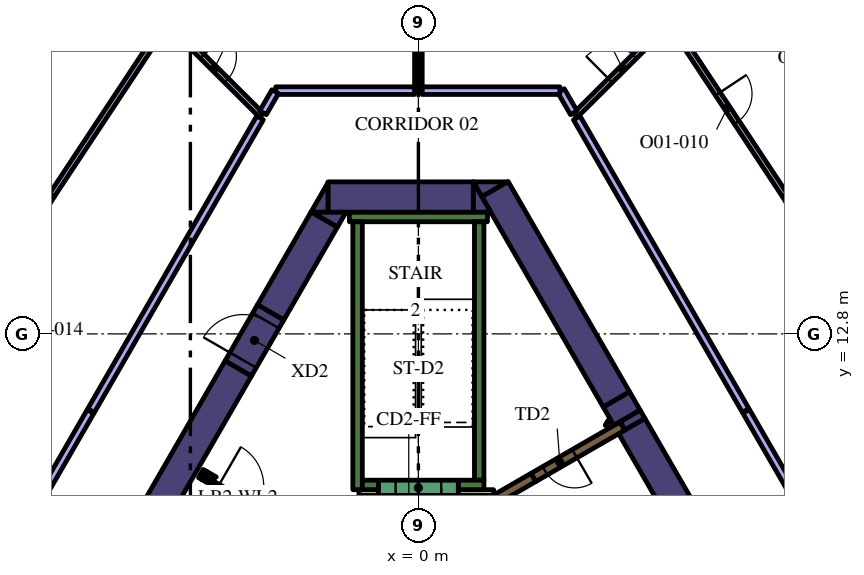
"""IFC4 building model, lengths in metres.
Left out: names, types, materials, properties, quantities, classifications, styles, units other than length and angle.
Written with IfcOpenShell. Run it as: python <this file> out.ifc"""

import sys

from ifc_helpers import new_model, si_unit, direction, frame, frame_2d, origin, place, context, subcontext, project, spatial, polyline, rectangle, outline, extrude, element, fill, save


model = new_model("IFC4")
c1 = context("Model", 3, precision=1e-05, world=origin(), true_north=direction((0.0, 1.0)))
c2 = subcontext(c1, "Body", "Model", "MODEL_VIEW")
j1 = project(units=[si_unit("LENGTHUNIT", "METRE"), si_unit("PLANEANGLEUNIT", "RADIAN")], contexts=[c1])
p1 = place(None, origin())
s1 = spatial("IfcSite", under=j1, at=p1, CompositionType="ELEMENT")
p2 = place(p1, origin())
s2 = spatial("IfcBuilding", under=s1, at=p2, CompositionType="ELEMENT")
p3 = place(p2, frame((0.0, 0.0, 150.0)))
s3 = spatial("IfcBuildingStorey", under=s2, at=p3, CompositionType="ELEMENT", Elevation=150.0)
p4 = place(p3, frame((5.489, 10.594, 0.0), z_axis=(0.0, 0.0, 1.0), x_axis=(-0.500000383388, 0.866025182435, 0.0)))
e1 = element("IfcWall", 1, at=p4, inside=s3, PredefinedType="SOLIDWALL", context=c2, shape_type="SweptSolid", body=[
    extrude(rectangle(XDim=0.558, YDim=0.8, at=frame_2d((0.279, 0.0))), origin(), (0.0, 0.0, 1.0), 4.2),
])
p5 = place(p3, frame((5.615, 10.375, 0.0), z_axis=(0.0, 0.0, 1.0), x_axis=(0.500002746266, -0.866023818221, 0.0)))
e2 = element("IfcWall", 2, at=p5, inside=s3, PredefinedType="SOLIDWALL", context=c2, shape_type="SweptSolid", body=[
    extrude(rectangle(XDim=5.328, YDim=0.8, at=frame_2d((2.664, 0.0))), origin(), (0.0, 0.0, 1.0), 4.2),
])
p6 = place(p3, origin())
e3 = element("IfcWall", 3, at=p6, inside=s3, PredefinedType="SOLIDWALL", context=c2, shape_type="SweptSolid", body=[
    extrude(outline(polyline([(5.432, 10.272), (5.308, 10.487), (5.836, 10.792), (5.96, 10.577), (5.432, 10.272)])), origin(), (0.0, 0.0, 1.0), 4.2),
])
p7 = place(p3, frame((5.209, 11.078, 0.0), z_axis=(0.0, 0.0, 1.0), x_axis=(-0.500035624827, 0.866004834804, 0.0)))
e4 = element("IfcWall", 4, at=p7, inside=s3, PredefinedType="SOLIDWALL", context=c2, shape_type="SweptSolid", body=[
    extrude(rectangle(XDim=6.388, YDim=0.8, at=frame_2d((3.194, 0.0))), origin(), (0.0, 0.0, 1.0), 4.2),
])
e5 = element("IfcWall", 5, at=p6, inside=s3, PredefinedType="SOLIDWALL", context=c2, shape_type="SweptSolid", body=[
    extrude(outline(polyline([(1.443, 16.8), (2.339, 16.8), (1.667, 16.412), (1.443, 16.8)])), origin(), (0.0, 0.0, 1.0), 4.2),
])
p8 = place(p3, frame((-2.379, 16.4, 0.0), z_axis=(0.0, 0.0, 1.0), x_axis=(1.0, 0.0, 0.0)))
e6 = element("IfcWall", 6, at=p8, inside=s3, PredefinedType="SOLIDWALL", context=c2, shape_type="SweptSolid", body=[
    extrude(rectangle(XDim=3.824, YDim=0.8, at=frame_2d((1.912, 0.0))), origin(), (0.0, 0.0, 1.0), 4.2),
])
e7 = element("IfcWall", 7, at=p6, inside=s3, PredefinedType="SOLIDWALL", context=c2, shape_type="SweptSolid", body=[
    extrude(outline(polyline([(1.905, 16.0), (1.447, 16.0), (1.447, 16.793), (1.905, 16.0)])), origin(), (0.0, 0.0, 1.0), 4.2),
])
e8 = element("IfcWall", 8, at=p6, inside=s3, PredefinedType="SOLIDWALL", context=c2, shape_type="SweptSolid", body=[
    extrude(outline(polyline([(-2.829, 16.0), (-2.381, 16.776), (-2.381, 16.0), (-2.829, 16.0)])), origin(), (0.0, 0.0, 1.0), 4.2),
])
p9 = place(p3, frame((-2.477, 15.81, 0.0), z_axis=(0.0, 0.0, 1.0), x_axis=(-0.499969377405, -0.866043083026, 0.0)))
e9 = element("IfcWall", 9, at=p9, inside=s3, PredefinedType="SOLIDWALL", context=c2, shape_type="SweptSolid", body=[
    extrude(rectangle(XDim=2.824, YDim=0.8, at=frame_2d((1.412, 0.0))), origin(), (0.0, 0.0, 1.0), 4.2),
])
e10 = element("IfcWall", 10, at=p6, inside=s3, PredefinedType="SOLIDWALL", context=c2, shape_type="SweptSolid", body=[
    extrude(outline(polyline([(-1.905, 16.0), (-2.129, 15.612), (-2.801, 16.0), (-1.905, 16.0)])), origin(), (0.0, 0.0, 1.0), 4.2),
])
p10 = place(p3, frame((-12.668, -1.842, 0.0), z_axis=(0.0, 0.0, 1.0), x_axis=(0.500003640647, 0.866023301845, 0.0)))
e11 = element("IfcWall", 11, at=p10, inside=s3, PredefinedType="SOLIDWALL", context=c2, shape_type="SweptSolid", body=[
    extrude(rectangle(XDim=15.858, YDim=0.8, at=frame_2d((7.929, 0.0))), origin(), (0.0, 0.0, 1.0), 4.2),
])
p11 = place(p3, frame((-1.817, 15.875, 0.0), z_axis=(0.0, 0.0, 1.0), x_axis=(1.0, 0.0, 0.0)))
e12 = element("IfcWall", 12, at=p11, inside=s3, PredefinedType="SOLIDWALL", context=c2, shape_type="SweptSolid", body=[
    extrude(rectangle(XDim=3.634, YDim=0.25, at=frame_2d((1.817, 0.0))), origin(), (0.0, 0.0, 1.0), 4.2),
])
p12 = place(p3, frame((1.6, 8.95, 0.0), z_axis=(0.0, 0.0, 1.0), x_axis=(0.0, 1.0, 0.0)))
e13 = element("IfcWall", 13, at=p12, inside=s3, PredefinedType="SOLIDWALL", context=c2, shape_type="SweptSolid", body=[
    extrude(rectangle(XDim=6.8, YDim=0.25, at=frame_2d((3.4, 0.0))), origin(), (0.0, 0.0, 1.0), 4.2),
])
p13 = place(p3, frame((1.05, 8.825, 0.0), z_axis=(0.0, 0.0, 1.0), x_axis=(1.0, 0.0, 0.0)))
e14 = element("IfcWall", 14, at=p13, inside=s3, PredefinedType="SOLIDWALL", context=c2, shape_type="SweptSolid", body=[
    extrude(rectangle(XDim=0.675, YDim=0.25, at=frame_2d((0.337, 0.0))), origin(), (0.0, 0.0, 1.0), 4.2),
])
p14 = place(p3, frame((-1.6, 8.7, 0.0), z_axis=(0.0, 0.0, 1.0), x_axis=(0.0, 1.0, 0.0)))
e15 = element("IfcWall", 15, at=p14, inside=s3, PredefinedType="SOLIDWALL", context=c2, shape_type="SweptSolid", body=[
    extrude(rectangle(XDim=7.05, YDim=0.25, at=frame_2d((3.525, 0.0))), origin(), (0.0, 0.0, 1.0), 4.2),
])
p15 = place(p3, frame((-1.475, 8.825, 0.0), z_axis=(0.0, 0.0, 1.0), x_axis=(1.0, 0.0, 0.0)))
e16 = element("IfcWall", 16, at=p15, inside=s3, PredefinedType="SOLIDWALL", context=c2, shape_type="SweptSolid", body=[
    extrude(rectangle(XDim=0.425, YDim=0.25, at=frame_2d((0.212, 0.0))), origin(), (0.0, 0.0, 1.0), 4.2),
])
p16 = place(p3, frame((3.028, 9.023, 0.0), z_axis=(0.0, 0.0, 1.0), x_axis=(-0.866036587186, -0.49998062928, 0.0)))
e17 = element("IfcWall", 17, at=p16, inside=s3, PredefinedType="SOLIDWALL", context=c2, shape_type="SweptSolid", body=[
    extrude(rectangle(XDim=3.384, YDim=0.25, at=frame_2d((1.692, 0.0))), origin(), (0.0, 0.0, 1.0), 4.2),
])
p17 = place(p3, frame((-5.725, 9.125, 0.0), z_axis=(0.0, 0.0, 1.0), x_axis=(0.866185586049, -0.49972245349, 0.0)))
e18 = element("IfcWall", 18, at=p17, inside=s3, PredefinedType="SOLIDWALL", context=c2, shape_type="SweptSolid", body=[
    extrude(rectangle(XDim=0.11, YDim=0.25, at=frame_2d((0.055, 0.0))), origin(), (0.0, 0.0, 1.0), 4.2),
])
e19 = element("IfcWall", 19, at=p6, inside=s3, PredefinedType="SOLIDWALL", context=c2, shape_type="SweptSolid", body=[
    extrude(outline(polyline([(-5.689, 8.96), (-5.69, 8.961), (-5.565, 9.177), (-5.319, 9.035), (-5.335, 9.026), (-5.351, 9.015), (-5.366, 9.002), (-5.379, 8.988), (-5.392, 8.972), (-5.402, 8.956), (-5.412, 8.939), (-5.629, 9.064), (-5.629, 9.064), (-5.689, 8.96)])), origin(), (0.0, 0.0, 1.0), 4.2),
])
p18 = place(p3, frame((1.05, 8.625, 0.0), z_axis=(0.0, 0.0, 1.0), x_axis=(1.0, 0.0, 0.0)))
e20 = element("IfcWall", 20, at=p18, inside=s3, PredefinedType="PARTITIONING", context=c2, shape_type="SweptSolid", body=[
    extrude(rectangle(XDim=0.929, YDim=0.15, at=frame_2d((0.464, 0.0))), origin(), (0.0, 0.0, 1.0), 3.15),
])
p19 = place(p3, frame((-1.564, 8.625, 0.0), z_axis=(0.0, 0.0, 1.0), x_axis=(1.0, 0.0, 0.0)))
e21 = element("IfcWall", 21, at=p19, inside=s3, PredefinedType="PARTITIONING", context=c2, shape_type="SweptSolid", body=[
    extrude(rectangle(XDim=0.514, YDim=0.15, at=frame_2d((0.257, 0.0))), origin(), (0.0, 0.0, 1.0), 3.15),
])
p20 = place(p3, frame((4.98, 10.358, 0.0), z_axis=(0.0, 0.0, 1.0), x_axis=(0.500640202437, 0.86565546709, 0.0)))
e22 = element("IfcWall", 22, at=p20, inside=s3, PredefinedType="PARTITIONING", context=c2, shape_type="SweptSolid", body=[
    extrude(rectangle(XDim=0.146, YDim=0.15, at=frame_2d((0.073, 0.0))), origin(), (0.0, 0.0, 1.0), 3.15),
])
p21 = place(p3, frame((8.565, -2.185, 0.0), z_axis=(0.0, 0.0, 1.0), x_axis=(-0.499997954832, 0.866026584559, 0.0)))
e23 = element("IfcWall", 23, at=p21, inside=s3, PredefinedType="SOLIDWALL", context=c2, shape_type="SweptSolid", body=[
    extrude(rectangle(XDim=12.35, YDim=0.25, at=frame_2d((6.175, 0.0))), origin(), (0.0, 0.0, 1.0), 4.2),
])
p22 = place(p21, frame((0.585, 0.0, 0.0)))
e24 = element("IfcOpeningElement", 24, at=p22, cuts=e23, PredefinedType="OPENING", context=c2, shape_type="SweptSolid", body=[
    extrude(rectangle(XDim=1.1, YDim=2.1, at=frame_2d((0.55, 1.05))), frame((0.0, 0.135, 0.0), z_axis=(0.0, -1.0, 0.0), x_axis=(1.0, 0.0, 0.0)), (0.0, 0.0, 1.0), 0.27),
])
p23 = place(p3, frame((1.05, 8.75, 0.0), z_axis=(0.0, 0.0, 1.0), x_axis=(-1.0, 0.0, 0.0)))
e25 = element("IfcWall", 25, at=p23, inside=s3, PredefinedType="SOLIDWALL", context=c2, shape_type="SweptSolid", body=[
    extrude(rectangle(XDim=2.1, YDim=0.4, at=frame_2d((1.05, 0.0))), origin(), (0.0, 0.0, 1.0), 4.2),
])
p24 = place(p23, frame((0.45, 0.0, 0.0)))
e26 = element("IfcOpeningElement", 26, at=p24, cuts=e25, PredefinedType="OPENING", context=c2, shape_type="SweptSolid", body=[
    extrude(rectangle(XDim=1.2, YDim=2.1, at=frame_2d((0.6, 1.05))), frame((0.0, 0.21, 0.0), z_axis=(0.0, -1.0, 0.0), x_axis=(1.0, 0.0, 0.0)), (0.0, 0.0, 1.0), 0.42),
])
p25 = place(p3, frame((5.366, 10.373, 0.0), z_axis=(0.0, 0.0, 1.0), x_axis=(-0.866019956843, -0.50000943426, 0.0)))
e27 = element("IfcWall", 27, at=p25, inside=s3, PredefinedType="SOLIDWALL", context=c2, shape_type="SweptSolid", body=[
    extrude(rectangle(XDim=2.7, YDim=0.25, at=frame_2d((1.35, 0.0))), origin(), (0.0, 0.0, 1.0), 4.2),
])
p26 = place(p25, frame((1.45, 0.0, 0.0)))
e28 = element("IfcOpeningElement", 28, at=p26, cuts=e27, PredefinedType="OPENING", context=c2, shape_type="SweptSolid", body=[
    extrude(rectangle(XDim=0.9, YDim=2.1, at=frame_2d((0.45, 1.05))), frame((0.0, 0.135, 0.0), z_axis=(0.0, -1.0, 0.0), x_axis=(1.0, 0.0, 0.0)), (0.0, 0.0, 1.0), 0.27),
])
p27 = place(p3, frame((-5.659, 9.012, 0.0), z_axis=(0.0, 0.0, 1.0), x_axis=(0.866009402589, -0.500027713859, 0.0)))
e29 = element("IfcWall", 29, at=p27, inside=s3, PredefinedType="PARTITIONING", context=c2, shape_type="SweptSolid", body=[
    extrude(rectangle(XDim=2.1, YDim=0.12, at=frame_2d((1.05, 0.0))), origin(), (0.0, 0.0, 1.0), 3.15),
])
p28 = place(p27, frame((0.45, 0.0, 0.0)))
e30 = element("IfcOpeningElement", 30, at=p28, cuts=e29, PredefinedType="OPENING", context=c2, shape_type="SweptSolid", body=[
    extrude(rectangle(XDim=1.2, YDim=2.1, at=frame_2d((0.6, 1.05))), frame((0.0, 0.07, 0.0), z_axis=(0.0, -1.0, 0.0), x_axis=(1.0, 0.0, 0.0)), (0.0, 0.0, 1.0), 0.14),
])
p29 = place(p3, frame((-4.739, 11.892, 0.0), z_axis=(0.0, 0.0, 1.0), x_axis=(0.500062241894, 0.865989465428, 0.0)))
e31 = element("IfcWall", 31, at=p29, inside=s3, PredefinedType="SOLIDWALL", context=c2, shape_type="SweptSolid", body=[
    extrude(rectangle(XDim=1.7, YDim=0.8, at=frame_2d((0.85, 0.0))), origin(), (0.0, 0.0, 1.0), 4.2),
])
p30 = place(p29, frame((0.25, 0.0, 0.0)))
e32 = element("IfcOpeningElement", 32, at=p30, cuts=e31, PredefinedType="OPENING", context=c2, shape_type="SweptSolid", body=[
    extrude(rectangle(XDim=1.2, YDim=2.1, at=frame_2d((0.6, 1.05))), frame((0.0, 0.41, 0.0), z_axis=(0.0, -1.0, 0.0), x_axis=(1.0, 0.0, 0.0)), (0.0, 0.0, 1.0), 0.82),
])
p31 = place(p3, frame((11.19, 13.951, 0.0), z_axis=(0.0, 0.0, 1.0), x_axis=(-0.526165616903, 0.850382116221, 0.0)))
e33 = element("IfcWall", 33, at=p31, inside=s3, PredefinedType="PARTITIONING", context=c2, shape_type="SweptSolid", body=[
    extrude(rectangle(XDim=2.935, YDim=0.15, at=frame_2d((1.468, 0.0))), origin(), (0.0, 0.0, 1.0), 3.15),
])
p32 = place(p3, frame((6.616, 21.024, 0.0), z_axis=(0.0, 0.0, 1.0), x_axis=(0.551915124006, -0.833900291338, 0.0)))
e34 = element("IfcWall", 34, at=p32, inside=s3, PredefinedType="PARTITIONING", context=c2, shape_type="SweptSolid", body=[
    extrude(rectangle(XDim=5.488, YDim=0.15, at=frame_2d((2.744, 0.0))), origin(), (0.0, 0.0, 1.0), 3.15),
])
p33 = place(p32, frame((2.288, 0.0, 0.0)))
e35 = element("IfcOpeningElement", 35, at=p33, cuts=e34, PredefinedType="OPENING", context=c2, shape_type="SweptSolid", body=[
    extrude(rectangle(XDim=0.9, YDim=2.1, at=frame_2d((0.45, 1.05))), frame((0.0, 0.085, 0.0), z_axis=(0.0, -1.0, 0.0), x_axis=(1.0, 0.0, 0.0)), (0.0, 0.0, 1.0), 0.17),
])
p34 = place(p3, frame((4.128, 18.55, 0.0), z_axis=(0.0, 0.0, 1.0), x_axis=(0.709237676072, 0.704969445324, 0.0)))
e36 = element("IfcWall", 36, at=p34, inside=s3, PredefinedType="PARTITIONING", context=c2, shape_type="SweptSolid", body=[
    extrude(rectangle(XDim=3.432, YDim=0.15, at=frame_2d((1.716, 0.0))), origin(), (0.0, 0.0, 1.0), 3.15),
])
p35 = place(p34, frame((1.3, 0.0, 0.0)))
e37 = element("IfcOpeningElement", 37, at=p35, cuts=e36, PredefinedType="OPENING", context=c2, shape_type="SweptSolid", body=[
    extrude(rectangle(XDim=0.9, YDim=2.1, at=frame_2d((0.45, 1.05))), frame((0.0, 0.085, 0.0), z_axis=(0.0, -1.0, 0.0), x_axis=(1.0, 0.0, 0.0)), (0.0, 0.0, 1.0), 0.17),
])
p36 = place(p3, frame((13.63, 2.091, 0.0), z_axis=(0.0, 0.0, 1.0), x_axis=(-0.499990634175, 0.866030811078, 0.0)))
e38 = element("IfcWall", 38, at=p36, inside=s3, PredefinedType="PARTITIONING", context=c2, shape_type="SweptSolid", body=[
    extrude(rectangle(XDim=10.008, YDim=0.2, at=frame_2d((5.004, 0.0))), origin(), (0.0, 0.0, 1.0), 3.15),
])
p37 = place(p36, frame((4.5, 0.0, 0.0)))
e39 = element("IfcOpeningElement", 39, at=p37, cuts=e38, PredefinedType="OPENING", context=c2, shape_type="SweptSolid", body=[
    extrude(rectangle(XDim=1.0, YDim=2.1, at=frame_2d((0.5, 1.05))), frame((0.0, 0.11, 0.0), z_axis=(0.0, -1.0, 0.0), x_axis=(1.0, 0.0, 0.0)), (0.0, 0.0, 1.0), 0.22),
])
p38 = place(p3, frame((8.611, 10.785, 0.0), z_axis=(0.0, 0.0, 1.0), x_axis=(-0.499987928593, 0.866032373102, 0.0)))
e40 = element("IfcWall", 40, at=p38, inside=s3, PredefinedType="PARTITIONING", context=c2, shape_type="SweptSolid", body=[
    extrude(rectangle(XDim=8.889, YDim=0.2, at=frame_2d((4.445, 0.0))), origin(), (0.0, 0.0, 1.0), 3.15),
])
p39 = place(p3, frame((0.0, 19.2, 0.0), z_axis=(0.0, 0.0, 1.0), x_axis=(0.0, 1.0, 0.0)))
e41 = element("IfcWall", 41, at=p39, inside=s3, PredefinedType="PARTITIONING", context=c2, shape_type="SweptSolid", body=[
    extrude(rectangle(XDim=10.154, YDim=0.2, at=frame_2d((5.077, 0.0))), origin(), (0.0, 0.0, 1.0), 3.15),
])
p40 = place(p3, frame((4.089, 18.617, 0.0), z_axis=(0.0, 0.0, 1.0), x_axis=(-0.500120377296, 0.865955892764, 0.0)))
e42 = element("IfcWall", 42, at=p40, inside=s3, PredefinedType="PARTITIONING", context=c2, shape_type="SweptSolid", body=[
    extrude(rectangle(XDim=0.673, YDim=0.2, at=frame_2d((0.336, 0.0))), origin(), (0.0, 0.0, 1.0), 3.15),
])
p41 = place(p3, frame((3.723, 19.2, 0.0), z_axis=(0.0, 0.0, 1.0), x_axis=(-1.0, 0.0, 0.0)))
e43 = element("IfcWall", 43, at=p41, inside=s3, PredefinedType="PARTITIONING", context=c2, shape_type="SweptSolid", body=[
    extrude(rectangle(XDim=3.623, YDim=0.2, at=frame_2d((1.812, 0.0))), origin(), (0.0, 0.0, 1.0), 3.15),
])
p42 = place(p3, frame((-6.619, 21.027, 0.0), z_axis=(0.0, 0.0, 1.0), x_axis=(0.709188943058, -0.705018470002, 0.0)))
e44 = element("IfcWall", 44, at=p42, inside=s3, PredefinedType="PARTITIONING", context=c2, shape_type="SweptSolid", body=[
    extrude(rectangle(XDim=3.512, YDim=0.15, at=frame_2d((1.756, 0.0))), origin(), (0.0, 0.0, 1.0), 3.15),
])
p43 = place(p42, frame((1.312, 0.0, 0.0)))
e45 = element("IfcOpeningElement", 45, at=p43, cuts=e44, PredefinedType="OPENING", context=c2, shape_type="SweptSolid", body=[
    extrude(rectangle(XDim=0.9, YDim=2.1, at=frame_2d((0.45, 1.05))), frame((0.0, 0.085, 0.0), z_axis=(0.0, -1.0, 0.0), x_axis=(1.0, 0.0, 0.0)), (0.0, 0.0, 1.0), 0.17),
])
p44 = place(p3, frame((-0.1, 19.2, 0.0), z_axis=(0.0, 0.0, 1.0), x_axis=(-1.0, 0.0, 0.0)))
e46 = element("IfcWall", 46, at=p44, inside=s3, PredefinedType="PARTITIONING", context=c2, shape_type="SweptSolid", body=[
    extrude(rectangle(XDim=3.653, YDim=0.2, at=frame_2d((1.826, 0.0))), origin(), (0.0, 0.0, 1.0), 3.15),
])
p45 = place(p3, frame((-3.768, 19.174, 0.0), z_axis=(0.0, 0.0, 1.0), x_axis=(-0.499897828833, -0.8660843843, 0.0)))
e47 = element("IfcWall", 47, at=p45, inside=s3, PredefinedType="PARTITIONING", context=c2, shape_type="SweptSolid", body=[
    extrude(rectangle(XDim=0.643, YDim=0.2, at=frame_2d((0.321, 0.0))), origin(), (0.0, 0.0, 1.0), 3.15),
])
p46 = place(p3, frame((-6.658, 20.96, 0.0), z_axis=(0.0, 0.0, 1.0), x_axis=(-0.551907039463, -0.833905642019, 0.0)))
e48 = element("IfcWall", 48, at=p46, inside=s3, PredefinedType="PARTITIONING", context=c2, shape_type="SweptSolid", body=[
    extrude(rectangle(XDim=5.412, YDim=0.15, at=frame_2d((2.706, 0.0))), origin(), (0.0, 0.0, 1.0), 3.15),
])
p47 = place(p3, frame((-12.877, 11.224, 0.0), z_axis=(0.0, 0.0, 1.0), x_axis=(0.526202711334, 0.850359163286, 0.0)))
e49 = element("IfcWall", 49, at=p47, inside=s3, PredefinedType="PARTITIONING", context=c2, shape_type="SweptSolid", body=[
    extrude(rectangle(XDim=6.142, YDim=0.15, at=frame_2d((3.071, 0.0))), origin(), (0.0, 0.0, 1.0), 3.15),
])
p48 = place(p47, frame((2.642, 0.0, 0.0)))
e50 = element("IfcOpeningElement", 50, at=p48, cuts=e49, PredefinedType="OPENING", context=c2, shape_type="SweptSolid", body=[
    extrude(rectangle(XDim=0.9, YDim=2.1, at=frame_2d((0.45, 1.05))), frame((0.0, 0.085, 0.0), z_axis=(0.0, -1.0, 0.0), x_axis=(1.0, 0.0, 0.0)), (0.0, 0.0, 1.0), 0.17),
])
p49 = place(p3, frame((-8.628, 10.755, 0.0), z_axis=(0.0, 0.0, 1.0), x_axis=(-0.500004234368, -0.866022959057, 0.0)))
e51 = element("IfcWall", 51, at=p49, inside=s3, PredefinedType="PARTITIONING", context=c2, shape_type="SweptSolid", body=[
    extrude(rectangle(XDim=10.0, YDim=0.2, at=frame_2d((5.0, 0.0))), origin(), (0.0, 0.0, 1.0), 3.15),
])
p50 = place(p49, frame((4.5, 0.0, 0.0)))
e52 = element("IfcOpeningElement", 52, at=p50, cuts=e51, PredefinedType="OPENING", context=c2, shape_type="SweptSolid", body=[
    extrude(rectangle(XDim=1.0, YDim=2.1, at=frame_2d((0.5, 1.05))), frame((0.0, 0.11, 0.0), z_axis=(0.0, -1.0, 0.0), x_axis=(1.0, 0.0, 0.0)), (0.0, 0.0, 1.0), 0.22),
])
p51 = place(p3, frame((-4.167, 18.483, 0.0), z_axis=(0.0, 0.0, 1.0), x_axis=(-0.499974340325, -0.866040217898, 0.0)))
e53 = element("IfcWall", 53, at=p51, inside=s3, PredefinedType="PARTITIONING", context=c2, shape_type="SweptSolid", body=[
    extrude(rectangle(XDim=8.894, YDim=0.2, at=frame_2d((4.447, 0.0))), origin(), (0.0, 0.0, 1.0), 3.15),
])
p52 = place(p24, origin())
e54 = element("IfcDoor", 54, at=p52, inside=s3, OperationType="SINGLE_SWING_LEFT", PredefinedType="DOOR", context=c2, shape_type="SweptSolid", body=[
    extrude(rectangle(XDim=1.2, YDim=2.1, at=frame_2d((0.6, 1.05))), frame((0.0, 0.025, 0.0), z_axis=(0.0, -1.0, 0.0), x_axis=(1.0, 0.0, 0.0)), (0.0, 0.0, 1.0), 0.05),
])
fill(e26, e54)
p53 = place(p26, origin())
e55 = element("IfcDoor", 55, at=p53, inside=s3, OperationType="SINGLE_SWING_LEFT", PredefinedType="DOOR", context=c2, shape_type="SweptSolid", body=[
    extrude(rectangle(XDim=0.9, YDim=2.1, at=frame_2d((0.45, 1.05))), frame((0.0, 0.025, 0.0), z_axis=(0.0, -1.0, 0.0), x_axis=(1.0, 0.0, 0.0)), (0.0, 0.0, 1.0), 0.05),
])
fill(e28, e55)
p54 = place(p28, origin())
e56 = element("IfcDoor", 56, at=p54, inside=s3, OperationType="SINGLE_SWING_LEFT", PredefinedType="DOOR", context=c2, shape_type="SweptSolid", body=[
    extrude(rectangle(XDim=1.2, YDim=2.1, at=frame_2d((0.6, 1.05))), frame((0.0, 0.025, 0.0), z_axis=(0.0, -1.0, 0.0), x_axis=(1.0, 0.0, 0.0)), (0.0, 0.0, 1.0), 0.05),
])
fill(e30, e56)
p55 = place(p30, origin())
e57 = element("IfcDoor", 57, at=p55, inside=s3, OperationType="SINGLE_SWING_LEFT", PredefinedType="DOOR", context=c2, shape_type="SweptSolid", body=[
    extrude(rectangle(XDim=1.2, YDim=2.1, at=frame_2d((0.6, 1.05))), frame((0.0, 0.025, 0.0), z_axis=(0.0, -1.0, 0.0), x_axis=(1.0, 0.0, 0.0)), (0.0, 0.0, 1.0), 0.05),
])
fill(e32, e57)
p56 = place(p33, origin())
e58 = element("IfcDoor", 58, at=p56, inside=s3, OperationType="SINGLE_SWING_LEFT", PredefinedType="DOOR", context=c2, shape_type="SweptSolid", body=[
    extrude(rectangle(XDim=0.9, YDim=2.1, at=frame_2d((0.45, 1.05))), frame((0.0, 0.025, 0.0), z_axis=(0.0, -1.0, 0.0), x_axis=(1.0, 0.0, 0.0)), (0.0, 0.0, 1.0), 0.05),
])
fill(e35, e58)
p57 = place(p35, origin())
e59 = element("IfcDoor", 59, at=p57, inside=s3, OperationType="SINGLE_SWING_RIGHT", PredefinedType="DOOR", context=c2, shape_type="SweptSolid", body=[
    extrude(rectangle(XDim=0.9, YDim=2.1, at=frame_2d((0.45, 1.05))), frame((0.0, 0.025, 0.0), z_axis=(0.0, -1.0, 0.0), x_axis=(1.0, 0.0, 0.0)), (0.0, 0.0, 1.0), 0.05),
])
fill(e37, e59)
p58 = place(p43, origin())
e60 = element("IfcDoor", 60, at=p58, inside=s3, OperationType="SINGLE_SWING_RIGHT", PredefinedType="DOOR", context=c2, shape_type="SweptSolid", body=[
    extrude(rectangle(XDim=0.9, YDim=2.1, at=frame_2d((0.45, 1.05))), frame((0.0, 0.025, 0.0), z_axis=(0.0, -1.0, 0.0), x_axis=(1.0, 0.0, 0.0)), (0.0, 0.0, 1.0), 0.05),
])
fill(e45, e60)
save(model, sys.argv[1])
